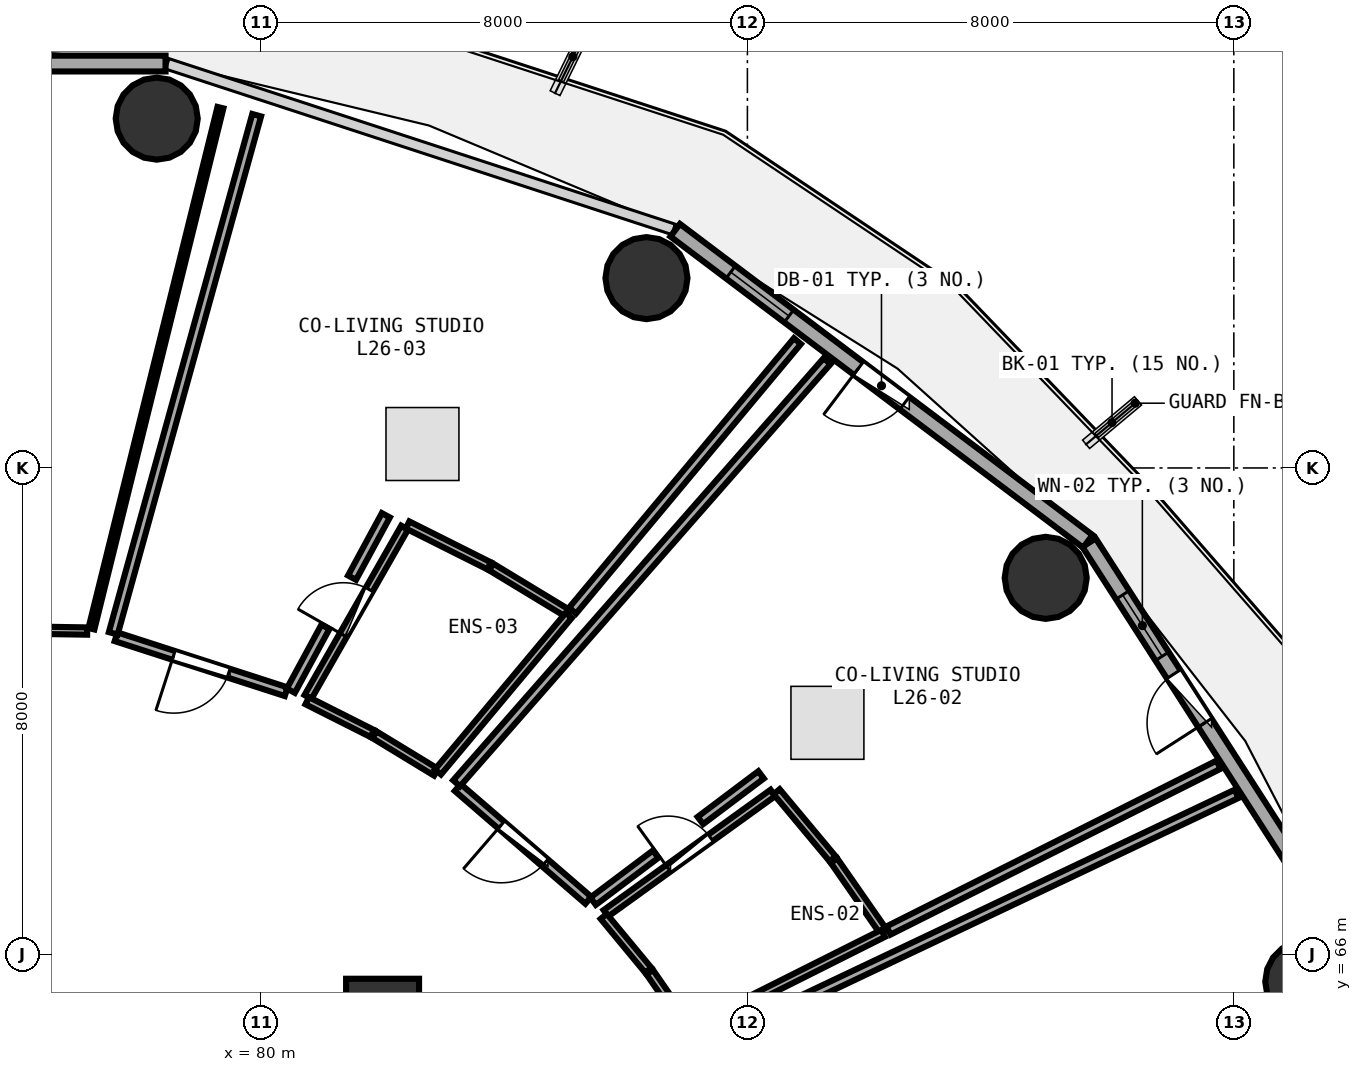
"""IFC4 building model, lengths in metres.
Left out: names, types, materials, properties, quantities, classifications, styles, units other than length and angle.
Written with IfcOpenShell. Run it as: python <this file> out.ifc"""

import sys

from ifc_helpers import new_model, si_unit, direction, frame, frame_2d, origin, origin_2d, place, context, subcontext, project, spatial, rectangle, circle, extrude, element, fill, save


model = new_model("IFC4")
c1 = context("Model", 3, precision=1e-05, world=origin(), true_north=direction((0.0, 1.0)))
c2 = subcontext(c1, "Body", "Model", "MODEL_VIEW")
j1 = project(units=[si_unit("LENGTHUNIT", "METRE"), si_unit("PLANEANGLEUNIT", "RADIAN")], contexts=[c1])
p1 = place(None, origin())
s1 = spatial("IfcSite", under=j1, at=p1, CompositionType="ELEMENT")
p2 = place(p1, origin())
s2 = spatial("IfcBuilding", under=s1, at=p2, CompositionType="ELEMENT")
p3 = place(p2, frame((0.0, 0.0, 102.6)))
s3 = spatial("IfcBuildingStorey", under=s2, at=p3, CompositionType="ELEMENT", Elevation=102.6)
p4 = place(p3, frame((82.0, 65.0, 0.0), z_axis=(0.0, 0.0, 1.0), x_axis=(1.0, 0.0, 0.0)))
e1 = element("IfcColumn", 1, at=p4, inside=s3, PredefinedType="PILASTER", context=c2, shape_type="SweptSolid", body=[
    extrude(rectangle(XDim=1.2, YDim=1.2, at=origin_2d()), origin(), (0.0, 0.0, 1.0), 3.75),
])
for number, where, z_axis, x_axis in (
    (2, (97.192, 65.552, 0.0), (0.0, 0.0, 1.0), (1.0, 0.0, 0.0)),
    (3, (92.906, 72.193, 0.0), (0.0, 0.0, 1.0), (1.0, 0.0, 0.0)),
    (4, (86.34, 77.122, 0.0), (0.0, 0.0, 1.0), (1.0, 0.0, 0.0)),
    (5, (78.286, 79.745, 0.0), (0.0, 0.0, 1.0), (1.0, 0.0, 0.0)),
):
    element("IfcColumn", number, at=place(p3, frame(where, z_axis=z_axis, x_axis=x_axis)), inside=s3, PredefinedType="COLUMN", context=c2, shape_type="SweptSolid", body=[
        extrude(circle(Radius=0.675, at=origin_2d()), origin(), (0.0, 0.0, 1.0), 3.75),
    ])
p5 = place(p3, frame((98.048, 65.879, 0.0), z_axis=(0.0, 0.0, 1.0), x_axis=(-0.540620528459, 0.841266571432, 0.0)))
e6 = element("IfcWall", 6, at=p5, inside=s3, PredefinedType="SOLIDWALL", context=c2, shape_type="SweptSolid", body=[
    extrude(rectangle(XDim=8.193, YDim=0.26, at=frame_2d((4.096, 0.0))), origin(), (0.0, 0.0, 1.0), 3.475),
])
p6 = place(p5, frame((4.671, 0.0, 0.0)))
e7 = element("IfcOpeningElement", 7, at=p6, cuts=e6, PredefinedType="OPENING", context=c2, shape_type="SweptSolid", body=[
    extrude(rectangle(XDim=0.95, YDim=2.1, at=frame_2d((0.475, 1.05))), frame((0.0, 0.14, 0.0), z_axis=(0.0, -1.0, 0.0), x_axis=(1.0, 0.0, 0.0)), (0.0, 0.0, 1.0), 0.28),
])
p7 = place(p5, frame((5.971, 0.0, 0.85)))
e8 = element("IfcOpeningElement", 8, at=p7, cuts=e6, PredefinedType="OPENING", context=c2, shape_type="SweptSolid", body=[
    extrude(rectangle(XDim=1.2, YDim=1.45, at=frame_2d((0.6, 0.725))), frame((0.0, 0.14, 0.0), z_axis=(0.0, -1.0, 0.0), x_axis=(1.0, 0.0, 0.0)), (0.0, 0.0, 1.0), 0.28),
])
p8 = place(p3, frame((93.599, 72.793, 0.0), z_axis=(0.0, 0.0, 1.0), x_axis=(-0.798501507879, 0.601992808857, 0.0)))
e9 = element("IfcWall", 9, at=p8, inside=s3, PredefinedType="SOLIDWALL", context=c2, shape_type="SweptSolid", body=[
    extrude(rectangle(XDim=8.499, YDim=0.26, at=frame_2d((4.25, 0.0))), origin(), (0.0, 0.0, 1.0), 3.475),
])
p9 = place(p8, frame((3.775, 0.0, 0.0)))
e10 = element("IfcOpeningElement", 10, at=p9, cuts=e9, PredefinedType="OPENING", context=c2, shape_type="SweptSolid", body=[
    extrude(rectangle(XDim=0.95, YDim=2.1, at=frame_2d((0.475, 1.05))), frame((0.0, 0.14, 0.0), z_axis=(0.0, -1.0, 0.0), x_axis=(1.0, 0.0, 0.0)), (0.0, 0.0, 1.0), 0.28),
])
p10 = place(p8, frame((6.155, 0.0, 0.85)))
e11 = element("IfcOpeningElement", 11, at=p10, cuts=e9, PredefinedType="OPENING", context=c2, shape_type="SweptSolid", body=[
    extrude(rectangle(XDim=1.2, YDim=1.45, at=frame_2d((0.6, 0.725))), frame((0.0, 0.14, 0.0), z_axis=(0.0, -1.0, 0.0), x_axis=(1.0, 0.0, 0.0)), (0.0, 0.0, 1.0), 0.28),
])
p11 = place(p3, frame((78.43, 80.651, 0.0), z_axis=(0.0, 0.0, 1.0), x_axis=(-1.0, 0.0, 0.0)))
e12 = element("IfcWall", 12, at=p11, inside=s3, PredefinedType="SOLIDWALL", context=c2, shape_type="SweptSolid", body=[
    extrude(rectangle(XDim=8.861, YDim=0.26, at=frame_2d((4.43, 0.0))), origin(), (0.0, 0.0, 1.0), 3.475),
])
p12 = place(p11, frame((3.63, 0.0, 0.85)))
e13 = element("IfcOpeningElement", 13, at=p12, cuts=e12, PredefinedType="OPENING", context=c2, shape_type="SweptSolid", body=[
    extrude(rectangle(XDim=1.6, YDim=1.45, at=frame_2d((0.8, 0.725))), frame((0.0, 0.14, 0.0), z_axis=(0.0, -1.0, 0.0), x_axis=(1.0, 0.0, 0.0)), (0.0, 0.0, 1.0), 0.28),
])
p13 = place(p3, frame((85.673, 66.676, 0.0), z_axis=(0.0, 0.0, 1.0), x_axis=(0.811192287952, 0.584779507137, 0.0)))
e14 = element("IfcWall", 14, at=p13, inside=s3, PredefinedType="PLUMBINGWALL", context=c2, shape_type="SweptSolid", body=[
    extrude(rectangle(XDim=3.386, YDim=0.13, at=frame_2d((1.693, 0.0))), origin(), (0.0, 0.0, 1.0), 3.235),
])
p14 = place(p13, frame((1.263, 0.0, 0.0)))
e15 = element("IfcOpeningElement", 15, at=p14, cuts=e14, PredefinedType="OPENING", context=c2, shape_type="SweptSolid", body=[
    extrude(rectangle(XDim=0.86, YDim=2.05, at=frame_2d((0.43, 1.025))), frame((0.0, 0.075, 0.0), z_axis=(0.0, -1.0, 0.0), x_axis=(1.0, 0.0, 0.0)), (0.0, 0.0, 1.0), 0.15),
])
p15 = place(p3, frame((85.385, 66.89, 0.0), z_axis=(0.0, 0.0, 1.0), x_axis=(-0.756913909666, 0.65351460072, 0.0)))
e16 = element("IfcWall", 16, at=p15, inside=s3, PredefinedType="PARTITIONING", context=c2, shape_type="SweptSolid", body=[
    extrude(rectangle(XDim=2.838, YDim=0.15, at=frame_2d((1.419, 0.0))), origin(), (0.0, 0.0, 1.0), 2.925),
])
p16 = place(p15, frame((0.944, 0.0, 0.0)))
e17 = element("IfcOpeningElement", 17, at=p16, cuts=e16, PredefinedType="OPENING", context=c2, shape_type="SweptSolid", body=[
    extrude(rectangle(XDim=0.95, YDim=2.08, at=frame_2d((0.475, 1.04))), frame((0.0, 0.085, 0.0), z_axis=(0.0, -1.0, 0.0), x_axis=(1.0, 0.0, 0.0)), (0.0, 0.0, 1.0), 0.17),
])
p17 = place(p3, frame((80.773, 70.233, 0.0), z_axis=(0.0, 0.0, 1.0), x_axis=(0.49568821927, 0.868500540747, 0.0)))
e18 = element("IfcWall", 18, at=p17, inside=s3, PredefinedType="PLUMBINGWALL", context=c2, shape_type="SweptSolid", body=[
    extrude(rectangle(XDim=3.209, YDim=0.13, at=frame_2d((1.604, 0.0))), origin(), (0.0, 0.0, 1.0), 2.925),
])
p18 = place(p17, frame((1.174, 0.0, 0.0)))
e19 = element("IfcOpeningElement", 19, at=p18, cuts=e18, PredefinedType="OPENING", context=c2, shape_type="SweptSolid", body=[
    extrude(rectangle(XDim=0.86, YDim=2.05, at=frame_2d((0.43, 1.025))), frame((0.0, 0.075, 0.0), z_axis=(0.0, -1.0, 0.0), x_axis=(1.0, 0.0, 0.0)), (0.0, 0.0, 1.0), 0.15),
])
p19 = place(p3, frame((80.415, 70.32, 0.0), z_axis=(0.0, 0.0, 1.0), x_axis=(-0.951622481895, 0.307269673009, 0.0)))
e20 = element("IfcWall", 20, at=p19, inside=s3, PredefinedType="PARTITIONING", context=c2, shape_type="SweptSolid", body=[
    extrude(rectangle(XDim=2.94, YDim=0.15, at=frame_2d((1.47, 0.0))), origin(), (0.0, 0.0, 1.0), 3.235),
])
p20 = place(p19, frame((0.995, 0.0, 0.0)))
e21 = element("IfcOpeningElement", 21, at=p20, cuts=e20, PredefinedType="OPENING", context=c2, shape_type="SweptSolid", body=[
    extrude(rectangle(XDim=0.95, YDim=2.08, at=frame_2d((0.475, 1.04))), frame((0.0, 0.085, 0.0), z_axis=(0.0, -1.0, 0.0), x_axis=(1.0, 0.0, 0.0)), (0.0, 0.0, 1.0), 0.17),
])
p21 = place(p3, frame((77.142, 71.318, 0.0), z_axis=(0.0, 0.0, 1.0), x_axis=(-0.999874771211, 0.015825356091, 0.0)))
e22 = element("IfcWall", 22, at=p21, inside=s3, PredefinedType="PARTITIONING", context=c2, shape_type="SweptSolid", body=[
    extrude(rectangle(XDim=5.77, YDim=0.12, at=frame_2d((2.885, 0.0))), origin(), (0.0, 0.0, 1.0), 3.48),
])
p22 = place(p21, frame((2.435, 0.0, 0.0)))
e23 = element("IfcOpeningElement", 23, at=p22, cuts=e22, PredefinedType="OPENING", context=c2, shape_type="SweptSolid", body=[
    extrude(rectangle(XDim=0.9, YDim=2.08, at=frame_2d((0.45, 1.04))), frame((0.0, 0.07, 0.0), z_axis=(0.0, -1.0, 0.0), x_axis=(1.0, 0.0, 0.0)), (0.0, 0.0, 1.0), 0.14),
])
p23 = place(p3, frame((87.27, 64.479, 0.0), z_axis=(0.0, 0.0, 1.0), x_axis=(0.903543765611, 0.428495815178, 0.0)))
e24 = element("IfcWall", 24, at=p23, inside=s3, PredefinedType="PARTITIONING", context=c2, shape_type="SweptSolid", body=[
    extrude(rectangle(XDim=9.713, YDim=0.15, at=frame_2d((4.856, 0.0))), origin(), (0.0, 0.0, 1.0), 2.925),
])
p24 = place(p3, frame((87.045, 64.769, 0.0), z_axis=(0.0, 0.0, 1.0), x_axis=(-0.569710294604, 0.821845593906, 0.0)))
e25 = element("IfcWall", 25, at=p24, inside=s3, PredefinedType="PLUMBINGWALL", context=c2, shape_type="SweptSolid", body=[
    extrude(rectangle(XDim=1.142, YDim=0.13, at=frame_2d((0.571, 0.0))), origin(), (0.0, 0.0, 1.0), 2.925),
])
p25 = place(p3, frame((86.37, 65.74, 0.0), z_axis=(0.0, 0.0, 1.0), x_axis=(-0.63765459476, 0.770322411579, 0.0)))
e26 = element("IfcWall", 26, at=p25, inside=s3, PredefinedType="PLUMBINGWALL", context=c2, shape_type="SweptSolid", body=[
    extrude(rectangle(XDim=1.15, YDim=0.13, at=frame_2d((0.575, 0.0))), origin(), (0.0, 0.0, 1.0), 3.48),
])
p26 = place(p3, frame((88.481, 68.676, 0.0), z_axis=(0.0, 0.0, 1.0), x_axis=(0.640685734907, -0.767803222894, 0.0)))
e27 = element("IfcWall", 27, at=p26, inside=s3, PredefinedType="PLUMBINGWALL", context=c2, shape_type="SweptSolid", body=[
    extrude(rectangle(XDim=1.437, YDim=0.13, at=frame_2d((0.718, 0.0))), origin(), (0.0, 0.0, 1.0), 3.48),
])
p27 = place(p3, frame((89.425, 67.541, 0.0), z_axis=(0.0, 0.0, 1.0), x_axis=(0.571009238548, -0.820943633566, 0.0)))
e28 = element("IfcWall", 28, at=p27, inside=s3, PredefinedType="PLUMBINGWALL", context=c2, shape_type="SweptSolid", body=[
    extrude(rectangle(XDim=1.424, YDim=0.13, at=frame_2d((0.712, 0.0))), origin(), (0.0, 0.0, 1.0), 3.48),
])
p28 = place(p3, frame((90.232, 66.346, 0.0), z_axis=(0.0, 0.0, 1.0), x_axis=(-0.893873710096, -0.448318849034, 0.0)))
e29 = element("IfcWall", 29, at=p28, inside=s3, PredefinedType="PLUMBINGWALL", context=c2, shape_type="SweptSolid", body=[
    extrude(rectangle(XDim=3.533, YDim=0.13, at=frame_2d((1.767, 0.0))), origin(), (0.0, 0.0, 1.0), 2.925),
])
p29 = place(p3, frame((83.217, 68.814, 0.0), z_axis=(0.0, 0.0, 1.0), x_axis=(0.659635901966, 0.751585309088, 0.0)))
e30 = element("IfcWall", 30, at=p29, inside=s3, PredefinedType="PARTITIONING", context=c2, shape_type="SweptSolid", body=[
    extrude(rectangle(XDim=9.237, YDim=0.15, at=frame_2d((4.619, 0.0))), origin(), (0.0, 0.0, 1.0), 2.925),
])
p30 = place(p3, frame((95.749, 69.12, 0.0), z_axis=(0.0, 0.0, 1.0), x_axis=(-0.89358164897, -0.448900697954, 0.0)))
e31 = element("IfcWall", 31, at=p30, inside=s3, PredefinedType="PARTITIONING", context=c2, shape_type="SweptSolid", body=[
    extrude(rectangle(XDim=6.075, YDim=0.15, at=frame_2d((3.038, 0.0))), origin(), (0.0, 0.0, 1.0), 2.975),
])
p31 = place(p3, frame((88.225, 68.953, 0.0), z_axis=(0.0, 0.0, 1.0), x_axis=(-0.799225323022, -0.601031515846, 0.0)))
e32 = element("IfcWall", 32, at=p31, inside=s3, PredefinedType="PARTITIONING", context=c2, shape_type="SweptSolid", body=[
    extrude(rectangle(XDim=1.249, YDim=0.15, at=frame_2d((0.625, 0.0))), origin(), (0.0, 0.0, 1.0), 2.925),
])
p32 = place(p3, frame((86.491, 67.649, 0.0), z_axis=(0.0, 0.0, 1.0), x_axis=(-0.799180360415, -0.601091300492, 0.0)))
e33 = element("IfcWall", 33, at=p32, inside=s3, PredefinedType="PARTITIONING", context=c2, shape_type="SweptSolid", body=[
    extrude(rectangle(XDim=1.288, YDim=0.15, at=frame_2d((0.644, 0.0))), origin(), (0.0, 0.0, 1.0), 3.235),
])
p33 = place(p3, frame((82.881, 68.995, 0.0), z_axis=(0.0, 0.0, 1.0), x_axis=(-0.854269908405, 0.51982970634, 0.0)))
e34 = element("IfcWall", 34, at=p33, inside=s3, PredefinedType="PLUMBINGWALL", context=c2, shape_type="SweptSolid", body=[
    extrude(rectangle(XDim=1.189, YDim=0.13, at=frame_2d((0.595, 0.0))), origin(), (0.0, 0.0, 1.0), 3.48),
])
p34 = place(p3, frame((81.83, 69.633, 0.0), z_axis=(0.0, 0.0, 1.0), x_axis=(-0.89291318054, 0.450228888475, 0.0)))
e35 = element("IfcWall", 35, at=p34, inside=s3, PredefinedType="PLUMBINGWALL", context=c2, shape_type="SweptSolid", body=[
    extrude(rectangle(XDim=1.197, YDim=0.13, at=frame_2d((0.599, 0.0))), origin(), (0.0, 0.0, 1.0), 2.925),
])
p35 = place(p3, frame((82.411, 73.063, 0.0), z_axis=(0.0, 0.0, 1.0), x_axis=(0.893970784776, -0.448125245848, 0.0)))
e36 = element("IfcWall", 36, at=p35, inside=s3, PredefinedType="PLUMBINGWALL", context=c2, shape_type="SweptSolid", body=[
    extrude(rectangle(XDim=1.499, YDim=0.13, at=frame_2d((0.75, 0.0))), origin(), (0.0, 0.0, 1.0), 3.175),
])
p36 = place(p3, frame((83.786, 72.372, 0.0), z_axis=(0.0, 0.0, 1.0), x_axis=(0.855341160713, -0.518065149175, 0.0)))
e37 = element("IfcWall", 37, at=p36, inside=s3, PredefinedType="PLUMBINGWALL", context=c2, shape_type="SweptSolid", body=[
    extrude(rectangle(XDim=1.487, YDim=0.13, at=frame_2d((0.743, 0.0))), origin(), (0.0, 0.0, 1.0), 2.925),
])
p37 = place(p3, frame((85.062, 71.576, 0.0), z_axis=(0.0, 0.0, 1.0), x_axis=(-0.641092758396, -0.767463403123, 0.0)))
e38 = element("IfcWall", 38, at=p37, inside=s3, PredefinedType="PLUMBINGWALL", context=c2, shape_type="SweptSolid", body=[
    extrude(rectangle(XDim=3.356, YDim=0.13, at=frame_2d((1.678, 0.0))), origin(), (0.0, 0.0, 1.0), 2.925),
])
p38 = place(p3, frame((77.571, 71.281, 0.0), z_axis=(0.0, 0.0, 1.0), x_axis=(0.266746506471, 0.963766725554, 0.0)))
e39 = element("IfcWall", 39, at=p38, inside=s3, PredefinedType="PARTITIONING", context=c2, shape_type="SweptSolid", body=[
    extrude(rectangle(XDim=8.841, YDim=0.15, at=frame_2d((4.421, 0.0))), origin(), (0.0, 0.0, 1.0), 2.925),
])
p39 = place(p3, frame((88.823, 76.086, 0.0), z_axis=(0.0, 0.0, 1.0), x_axis=(-0.640629420745, -0.767850210182, 0.0)))
e40 = element("IfcWall", 40, at=p39, inside=s3, PredefinedType="PARTITIONING", context=c2, shape_type="SweptSolid", body=[
    extrude(rectangle(XDim=5.772, YDim=0.15, at=frame_2d((2.886, 0.0))), origin(), (0.0, 0.0, 1.0), 2.975),
])
p40 = place(p3, frame((82.054, 73.222, 0.0), z_axis=(0.0, 0.0, 1.0), x_axis=(-0.476431432847, -0.879211629698, 0.0)))
e41 = element("IfcWall", 41, at=p40, inside=s3, PredefinedType="PARTITIONING", context=c2, shape_type="SweptSolid", body=[
    extrude(rectangle(XDim=1.167, YDim=0.15, at=frame_2d((0.583, 0.0))), origin(), (0.0, 0.0, 1.0), 3.175),
])
p41 = place(p3, frame((81.06, 71.387, 0.0), z_axis=(0.0, 0.0, 1.0), x_axis=(-0.476184304259, -0.879345500004, 0.0)))
e42 = element("IfcWall", 42, at=p41, inside=s3, PredefinedType="PARTITIONING", context=c2, shape_type="SweptSolid", body=[
    extrude(rectangle(XDim=1.194, YDim=0.15, at=frame_2d((0.597, 0.0))), origin(), (0.0, 0.0, 1.0), 2.925),
])
p42 = place(p3, frame((79.333, 79.925, 0.0), z_axis=(0.0, 0.0, 1.0), x_axis=(-0.240342194274, -0.970688224741, 0.0)))
e43 = element("IfcWall", 43, at=p42, inside=s3, PredefinedType="PARTITIONING", context=c2, shape_type="SweptSolid", body=[
    extrude(rectangle(XDim=8.828, YDim=0.1, at=frame_2d((4.414, 0.0))), origin(), (0.0, 0.0, 1.0), 2.925),
])
p43 = place(p6, frame((0.95, 0.0, 0.0), z_axis=(0.0, 0.0, 1.0), x_axis=(-1.0, 0.0, 0.0)))
e44 = element("IfcDoor", 44, at=p43, inside=s3, OperationType="SINGLE_SWING_RIGHT", PredefinedType="DOOR", context=c2, shape_type="SweptSolid", body=[
    extrude(rectangle(XDim=0.95, YDim=2.1, at=frame_2d((0.475, 1.05))), frame((0.0, 0.025, 0.0), z_axis=(0.0, -1.0, 0.0), x_axis=(1.0, 0.0, 0.0)), (0.0, 0.0, 1.0), 0.05),
])
fill(e7, e44)
p44 = place(p7, origin())
e45 = element("IfcWindow", 45, at=p44, inside=s3, PartitioningType="SINGLE_PANEL", PredefinedType="WINDOW", context=c2, shape_type="SweptSolid", body=[
    extrude(rectangle(XDim=1.2, YDim=1.45, at=frame_2d((0.6, 0.725))), frame((0.0, 0.03, 0.0), z_axis=(0.0, -1.0, 0.0), x_axis=(1.0, 0.0, 0.0)), (0.0, 0.0, 1.0), 0.06),
])
fill(e8, e45)
p45 = place(p9, frame((0.95, 0.0, 0.0), z_axis=(0.0, 0.0, 1.0), x_axis=(-1.0, 0.0, 0.0)))
e46 = element("IfcDoor", 46, at=p45, inside=s3, OperationType="SINGLE_SWING_LEFT", PredefinedType="DOOR", context=c2, shape_type="SweptSolid", body=[
    extrude(rectangle(XDim=0.95, YDim=2.1, at=frame_2d((0.475, 1.05))), frame((0.0, 0.025, 0.0), z_axis=(0.0, -1.0, 0.0), x_axis=(1.0, 0.0, 0.0)), (0.0, 0.0, 1.0), 0.05),
])
fill(e10, e46)
p46 = place(p10, origin())
e47 = element("IfcWindow", 47, at=p46, inside=s3, PartitioningType="SINGLE_PANEL", PredefinedType="WINDOW", context=c2, shape_type="SweptSolid", body=[
    extrude(rectangle(XDim=1.2, YDim=1.45, at=frame_2d((0.6, 0.725))), frame((0.0, 0.03, 0.0), z_axis=(0.0, -1.0, 0.0), x_axis=(1.0, 0.0, 0.0)), (0.0, 0.0, 1.0), 0.06),
])
fill(e11, e47)
p47 = place(p14, origin())
e48 = element("IfcDoor", 48, at=p47, inside=s3, OperationType="SINGLE_SWING_LEFT", PredefinedType="DOOR", context=c2, shape_type="SweptSolid", body=[
    extrude(rectangle(XDim=0.86, YDim=2.05, at=frame_2d((0.43, 1.025))), frame((0.0, 0.025, 0.0), z_axis=(0.0, -1.0, 0.0), x_axis=(1.0, 0.0, 0.0)), (0.0, 0.0, 1.0), 0.05),
])
fill(e15, e48)
p48 = place(p16, origin())
e49 = element("IfcDoor", 49, at=p48, inside=s3, OperationType="SINGLE_SWING_RIGHT", PredefinedType="DOOR", context=c2, shape_type="SweptSolid", body=[
    extrude(rectangle(XDim=0.95, YDim=2.08, at=frame_2d((0.475, 1.04))), frame((0.0, 0.025, 0.0), z_axis=(0.0, -1.0, 0.0), x_axis=(1.0, 0.0, 0.0)), (0.0, 0.0, 1.0), 0.05),
])
fill(e17, e49)
p49 = place(p18, origin())
e50 = element("IfcDoor", 50, at=p49, inside=s3, OperationType="SINGLE_SWING_LEFT", PredefinedType="DOOR", context=c2, shape_type="SweptSolid", body=[
    extrude(rectangle(XDim=0.86, YDim=2.05, at=frame_2d((0.43, 1.025))), frame((0.0, 0.025, 0.0), z_axis=(0.0, -1.0, 0.0), x_axis=(1.0, 0.0, 0.0)), (0.0, 0.0, 1.0), 0.05),
])
fill(e19, e50)
p50 = place(p20, origin())
e51 = element("IfcDoor", 51, at=p50, inside=s3, OperationType="SINGLE_SWING_RIGHT", PredefinedType="DOOR", context=c2, shape_type="SweptSolid", body=[
    extrude(rectangle(XDim=0.95, YDim=2.08, at=frame_2d((0.475, 1.04))), frame((0.0, 0.025, 0.0), z_axis=(0.0, -1.0, 0.0), x_axis=(1.0, 0.0, 0.0)), (0.0, 0.0, 1.0), 0.05),
])
fill(e21, e51)
save(model, sys.argv[1])
